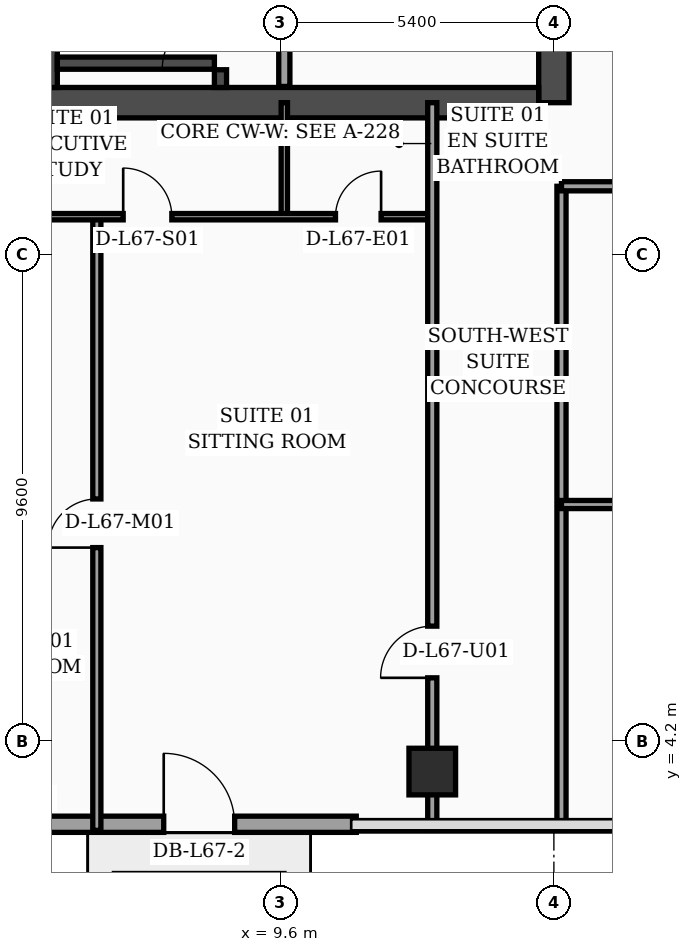
"""IFC4 building model, lengths in metres.
Left out: names, types, materials, properties, quantities, classifications, styles, units other than length and angle.
Written with IfcOpenShell. Run it as: python <this file> out.ifc"""

import sys

from ifc_helpers import new_model, si_unit, direction, frame, frame_2d, origin, origin_2d, place, context, subcontext, project, spatial, rectangle, extrude, element, fill, save


model = new_model("IFC4")
c1 = context("Model", 3, precision=1e-05, world=origin(), true_north=direction((0.0, 1.0)))
c2 = subcontext(c1, "Body", "Model", "MODEL_VIEW")
j1 = project(units=[si_unit("LENGTHUNIT", "METRE"), si_unit("PLANEANGLEUNIT", "RADIAN")], contexts=[c1])
p1 = place(None, origin())
s1 = spatial("IfcSite", under=j1, at=p1, CompositionType="ELEMENT")
p2 = place(p1, origin())
s2 = spatial("IfcBuilding", under=s1, at=p2, CompositionType="ELEMENT")
p3 = place(p2, frame((0.0, 0.0, 271.1)))
s3 = spatial("IfcBuildingStorey", under=s2, at=p3, CompositionType="ELEMENT", Elevation=271.1)
p4 = place(p3, frame((15.0, 16.8, 0.0), z_axis=(0.0, 0.0, 1.0), x_axis=(0.0, 1.0, 0.0)))
e1 = element("IfcWall", 1, at=p4, inside=s3, PredefinedType="SHEAR", context=c2, shape_type="SweptSolid", body=[
    extrude(rectangle(XDim=21.6, YDim=0.6, at=frame_2d((10.8, 0.0))), origin(), (0.0, 0.0, 1.0), 3.56),
])
p5 = place(p4, frame((8.65, 0.0, 0.0)))
e2 = element("IfcOpeningElement", 2, at=p5, cuts=e1, PredefinedType="OPENING", context=c2, shape_type="SweptSolid", body=[
    extrude(rectangle(XDim=1.1, YDim=2.2, at=frame_2d((0.55, 1.1))), frame((0.0, 0.31, 0.0), z_axis=(0.0, -1.0, 0.0), x_axis=(1.0, 0.0, 0.0)), (0.0, 0.0, 1.0), 0.62),
])
p6 = place(p4, frame((18.9, 0.0, 0.0)))
e3 = element("IfcOpeningElement", 3, at=p6, cuts=e1, PredefinedType="OPENING", context=c2, shape_type="SweptSolid", body=[
    extrude(rectangle(XDim=1.1, YDim=2.2, at=frame_2d((0.55, 1.1))), frame((0.0, 0.31, 0.0), z_axis=(0.0, -1.0, 0.0), x_axis=(1.0, 0.0, 0.0)), (0.0, 0.0, 1.0), 0.62),
])
p7 = place(p3, frame((4.5, 16.8, 0.0), z_axis=(0.0, 0.0, 1.0), x_axis=(1.0, 0.0, 0.0)))
e4 = element("IfcWall", 4, at=p7, inside=s3, PredefinedType="SHEAR", context=c2, shape_type="SweptSolid", body=[
    extrude(rectangle(XDim=10.2, YDim=0.6, at=frame_2d((5.1, 0.0))), origin(), (0.0, 0.0, 1.0), 3.56),
])
p8 = place(p3, frame((5.08, 17.1, 0.0), z_axis=(0.0, 0.0, 1.0), x_axis=(0.0, 1.0, 0.0)))
e5 = element("IfcWall", 5, at=p8, inside=s3, PredefinedType="SOLIDWALL", context=c2, shape_type="SweptSolid", body=[
    extrude(rectangle(XDim=9.69, YDim=0.24, at=frame_2d((4.845, 0.0))), origin(), (0.0, 0.0, 1.0), 3.56),
])
p9 = place(p3, frame((8.42, 17.1, 0.0), z_axis=(0.0, 0.0, 1.0), x_axis=(0.0, 1.0, 0.0)))
e6 = element("IfcWall", 6, at=p9, inside=s3, PredefinedType="SOLIDWALL", context=c2, shape_type="SweptSolid", body=[
    extrude(rectangle(XDim=9.69, YDim=0.24, at=frame_2d((4.845, 0.0))), origin(), (0.0, 0.0, 1.0), 3.56),
])
p10 = place(p9, frame((0.35, 0.0, 0.0)))
e7 = element("IfcOpeningElement", 7, at=p10, cuts=e6, PredefinedType="OPENING", context=c2, shape_type="SweptSolid", body=[
    extrude(rectangle(XDim=1.15, YDim=2.2, at=frame_2d((0.575, 1.1))), frame((0.0, 0.13, 0.0), z_axis=(0.0, -1.0, 0.0), x_axis=(1.0, 0.0, 0.0)), (0.0, 0.0, 1.0), 0.26),
])
p11 = place(p3, frame((5.2, 17.58, 0.0), z_axis=(0.0, 0.0, 1.0), x_axis=(1.0, 0.0, 0.0)))
e8 = element("IfcWall", 8, at=p11, inside=s3, PredefinedType="SOLIDWALL", context=c2, shape_type="SweptSolid", body=[
    extrude(rectangle(XDim=3.1, YDim=0.24, at=frame_2d((1.55, 0.0))), origin(), (0.0, 0.0, 1.0), 3.56),
])
p12 = place(p3, frame((12.6, 3.6, 0.0), z_axis=(0.0, 0.0, 1.0), x_axis=(1.0, 0.0, 0.0)))
e9 = element("IfcColumn", 9, at=p12, inside=s3, PredefinedType="COLUMN", context=c2, shape_type="SweptSolid", body=[
    extrude(rectangle(XDim=0.92, YDim=0.92, at=origin_2d()), origin(), (0.0, 0.0, 1.0), 3.56),
])
p13 = place(p3, frame((3.1, 2.56, 0.0), z_axis=(0.0, 0.0, 1.0), x_axis=(1.0, 0.0, 0.0)))
e10 = element("IfcWall", 10, at=p13, inside=s3, PredefinedType="SOLIDWALL", context=c2, shape_type="SweptSolid", body=[
    extrude(rectangle(XDim=8.0, YDim=0.32, at=frame_2d((4.0, 0.0))), origin(), (0.0, 0.0, 1.0), 3.56),
])
p14 = place(p13, frame((0.45, 0.0, 0.75)))
e11 = element("IfcOpeningElement", 11, at=p14, cuts=e10, PredefinedType="OPENING", context=c2, shape_type="SweptSolid", body=[
    extrude(rectangle(XDim=1.0, YDim=1.6, at=frame_2d((0.5, 0.8))), frame((0.0, 0.17, 0.0), z_axis=(0.0, -1.0, 0.0), x_axis=(1.0, 0.0, 0.0)), (0.0, 0.0, 1.0), 0.34),
])
p15 = place(p13, frame((4.2, 0.0, 0.0)))
e12 = element("IfcOpeningElement", 12, at=p15, cuts=e10, PredefinedType="OPENING", context=c2, shape_type="SweptSolid", body=[
    extrude(rectangle(XDim=1.4, YDim=2.25, at=frame_2d((0.7, 1.125))), frame((0.0, 0.17, 0.0), z_axis=(0.0, -1.0, 0.0), x_axis=(1.0, 0.0, 0.0)), (0.0, 0.0, 1.0), 0.34),
])
p16 = place(p3, frame((9.68, 17.12, 0.0), z_axis=(0.0, 0.0, 1.0), x_axis=(0.0, 1.0, 0.0)))
e13 = element("IfcWall", 13, at=p16, inside=s3, PredefinedType="SOLIDWALL", context=c2, shape_type="SweptSolid", body=[
    extrude(rectangle(XDim=7.88, YDim=0.22, at=frame_2d((3.94, 0.0))), origin(), (0.0, 0.0, 1.0), 3.56),
])
p17 = place(p3, frame((9.68, 14.55, 0.0), z_axis=(0.0, 0.0, 1.0), x_axis=(0.0, 1.0, 0.0)))
e14 = element("IfcWall", 14, at=p17, inside=s3, PredefinedType="PARTITIONING", context=c2, shape_type="SweptSolid", body=[
    extrude(rectangle(XDim=2.25, YDim=0.125, at=frame_2d((1.125, 0.0))), origin(), (0.0, 0.0, 1.0), 3.56),
])
p18 = place(p3, frame((5.98, 2.44, 0.0), z_axis=(0.0, 0.0, 1.0), x_axis=(0.0, 1.0, 0.0)))
e15 = element("IfcWall", 15, at=p18, inside=s3, PredefinedType="PARTITIONING", context=c2, shape_type="SweptSolid", body=[
    extrude(rectangle(XDim=12.11, YDim=0.16, at=frame_2d((6.055, 0.0))), origin(), (0.0, 0.0, 1.0), 3.09),
])
p19 = place(p18, frame((5.58, 0.0, 0.0)))
e16 = element("IfcOpeningElement", 16, at=p19, cuts=e15, PredefinedType="OPENING", context=c2, shape_type="SweptSolid", body=[
    extrude(rectangle(XDim=0.96, YDim=2.2, at=frame_2d((0.48, 1.1))), frame((0.0, 0.09, 0.0), z_axis=(0.0, -1.0, 0.0), x_axis=(1.0, 0.0, 0.0)), (0.0, 0.0, 1.0), 0.18),
])
p20 = place(p3, frame((3.2, 14.55, 0.0), z_axis=(0.0, 0.0, 1.0), x_axis=(1.0, 0.0, 0.0)))
e17 = element("IfcWall", 17, at=p20, inside=s3, PredefinedType="PARTITIONING", context=c2, shape_type="SweptSolid", body=[
    extrude(rectangle(XDim=9.4, YDim=0.125, at=frame_2d((4.7, 0.0))), origin(), (0.0, 0.0, 1.0), 2.99),
])
p21 = place(p20, frame((3.3, 0.0, 0.0)))
e18 = element("IfcOpeningElement", 18, at=p21, cuts=e17, PredefinedType="OPENING", context=c2, shape_type="SweptSolid", body=[
    extrude(rectangle(XDim=0.96, YDim=2.2, at=frame_2d((0.48, 1.1))), frame((0.0, 0.073, 0.0), z_axis=(0.0, -1.0, 0.0), x_axis=(1.0, 0.0, 0.0)), (0.0, 0.0, 1.0), 0.145),
])
p22 = place(p20, frame((7.49, 0.0, 0.0)))
e19 = element("IfcOpeningElement", 19, at=p22, cuts=e17, PredefinedType="OPENING", context=c2, shape_type="SweptSolid", body=[
    extrude(rectangle(XDim=0.9, YDim=2.15, at=frame_2d((0.45, 1.075))), frame((0.0, 0.073, 0.0), z_axis=(0.0, -1.0, 0.0), x_axis=(1.0, 0.0, 0.0)), (0.0, 0.0, 1.0), 0.145),
])
p23 = place(p3, frame((12.6, 2.44, 0.0), z_axis=(0.0, 0.0, 1.0), x_axis=(0.0, 1.0, 0.0)))
e20 = element("IfcWall", 20, at=p23, inside=s3, PredefinedType="PARTITIONING", context=c2, shape_type="SweptSolid", body=[
    extrude(rectangle(XDim=14.36, YDim=0.18, at=frame_2d((7.18, 0.0))), origin(), (0.0, 0.0, 1.0), 2.99),
])
p24 = place(p23, frame((3.01, 0.0, 0.0)))
e21 = element("IfcOpeningElement", 21, at=p24, cuts=e20, PredefinedType="OPENING", context=c2, shape_type="SweptSolid", body=[
    extrude(rectangle(XDim=1.02, YDim=2.2, at=frame_2d((0.51, 1.1))), frame((0.0, 0.1, 0.0), z_axis=(0.0, -1.0, 0.0), x_axis=(1.0, 0.0, 0.0)), (0.0, 0.0, 1.0), 0.2),
])
p25 = place(p3, frame((15.15, 2.44, 0.0), z_axis=(0.0, 0.0, 1.0), x_axis=(0.0, 1.0, 0.0)))
e22 = element("IfcWall", 22, at=p25, inside=s3, PredefinedType="PARTITIONING", context=c2, shape_type="SweptSolid", body=[
    extrude(rectangle(XDim=12.71, YDim=0.18, at=frame_2d((6.355, 0.0))), origin(), (0.0, 0.0, 1.0), 3.09),
])
p26 = place(p3, frame((15.15, 8.87, 0.0), z_axis=(0.0, 0.0, 1.0), x_axis=(1.0, 0.0, 0.0)))
e23 = element("IfcWall", 23, at=p26, inside=s3, PredefinedType="PARTITIONING", context=c2, shape_type="SweptSolid", body=[
    extrude(rectangle(XDim=4.45, YDim=0.16, at=frame_2d((2.225, 0.0))), origin(), (0.0, 0.0, 1.0), 3.56),
])
p27 = place(p26, frame((1.75, 0.0, 0.0)))
e24 = element("IfcOpeningElement", 24, at=p27, cuts=e23, PredefinedType="OPENING", context=c2, shape_type="SweptSolid", body=[
    extrude(rectangle(XDim=0.96, YDim=2.2, at=frame_2d((0.48, 1.1))), frame((0.0, 0.09, 0.0), z_axis=(0.0, -1.0, 0.0), x_axis=(1.0, 0.0, 0.0)), (0.0, 0.0, 1.0), 0.18),
])
p28 = place(p3, frame((15.15, 15.15, 0.0), z_axis=(0.0, 0.0, 1.0), x_axis=(1.0, 0.0, 0.0)))
e25 = element("IfcWall", 25, at=p28, inside=s3, PredefinedType="PARTITIONING", context=c2, shape_type="SweptSolid", body=[
    extrude(rectangle(XDim=6.45, YDim=0.18, at=frame_2d((3.225, 0.0))), origin(), (0.0, 0.0, 1.0), 2.59),
])
p29 = place(p28, frame((1.74, 0.0, 0.0)))
e26 = element("IfcOpeningElement", 26, at=p29, cuts=e25, PredefinedType="OPENING", context=c2, shape_type="SweptSolid", body=[
    extrude(rectangle(XDim=1.02, YDim=2.2, at=frame_2d((0.51, 1.1))), frame((0.0, 0.1, 0.0), z_axis=(0.0, -1.0, 0.0), x_axis=(1.0, 0.0, 0.0)), (0.0, 0.0, 1.0), 0.2),
])
p30 = place(p15, origin())
e27 = element("IfcDoor", 27, at=p30, inside=s3, OperationType="SINGLE_SWING_LEFT", PredefinedType="DOOR", context=c2, shape_type="SweptSolid", body=[
    extrude(rectangle(XDim=1.4, YDim=2.25, at=frame_2d((0.7, 1.125))), frame((0.0, 0.025, 0.0), z_axis=(0.0, -1.0, 0.0), x_axis=(1.0, 0.0, 0.0)), (0.0, 0.0, 1.0), 0.05),
])
fill(e12, e27)
p31 = place(p19, origin())
e28 = element("IfcDoor", 28, at=p31, inside=s3, OperationType="SINGLE_SWING_LEFT", PredefinedType="DOOR", context=c2, shape_type="SweptSolid", body=[
    extrude(rectangle(XDim=0.96, YDim=2.2, at=frame_2d((0.48, 1.1))), frame((0.0, 0.025, 0.0), z_axis=(0.0, -1.0, 0.0), x_axis=(1.0, 0.0, 0.0)), (0.0, 0.0, 1.0), 0.05),
])
fill(e16, e28)
p32 = place(p21, origin())
e29 = element("IfcDoor", 29, at=p32, inside=s3, OperationType="SINGLE_SWING_LEFT", PredefinedType="DOOR", context=c2, shape_type="SweptSolid", body=[
    extrude(rectangle(XDim=0.96, YDim=2.2, at=frame_2d((0.48, 1.1))), frame((0.0, 0.025, 0.0), z_axis=(0.0, -1.0, 0.0), x_axis=(1.0, 0.0, 0.0)), (0.0, 0.0, 1.0), 0.05),
])
fill(e18, e29)
p33 = place(p22, origin())
e30 = element("IfcDoor", 30, at=p33, inside=s3, OperationType="SINGLE_SWING_RIGHT", PredefinedType="DOOR", context=c2, shape_type="SweptSolid", body=[
    extrude(rectangle(XDim=0.9, YDim=2.15, at=frame_2d((0.45, 1.075))), frame((0.0, 0.025, 0.0), z_axis=(0.0, -1.0, 0.0), x_axis=(1.0, 0.0, 0.0)), (0.0, 0.0, 1.0), 0.05),
])
fill(e19, e30)
p34 = place(p24, origin())
e31 = element("IfcDoor", 31, at=p34, inside=s3, OperationType="SINGLE_SWING_LEFT", PredefinedType="DOOR", context=c2, shape_type="SweptSolid", body=[
    extrude(rectangle(XDim=1.02, YDim=2.2, at=frame_2d((0.51, 1.1))), frame((0.0, 0.025, 0.0), z_axis=(0.0, -1.0, 0.0), x_axis=(1.0, 0.0, 0.0)), (0.0, 0.0, 1.0), 0.05),
])
fill(e21, e31)
p35 = place(p10, origin())
e32 = element("IfcDoor", 32, at=p35, inside=s3, OperationType="SINGLE_SWING_LEFT", PredefinedType="DOOR", context=c2, shape_type="SweptSolid", body=[
    extrude(rectangle(XDim=1.15, YDim=2.2, at=frame_2d((0.575, 1.1))), frame((0.0, 0.025, 0.0), z_axis=(0.0, -1.0, 0.0), x_axis=(1.0, 0.0, 0.0)), (0.0, 0.0, 1.0), 0.05),
])
fill(e7, e32)
save(model, sys.argv[1])
